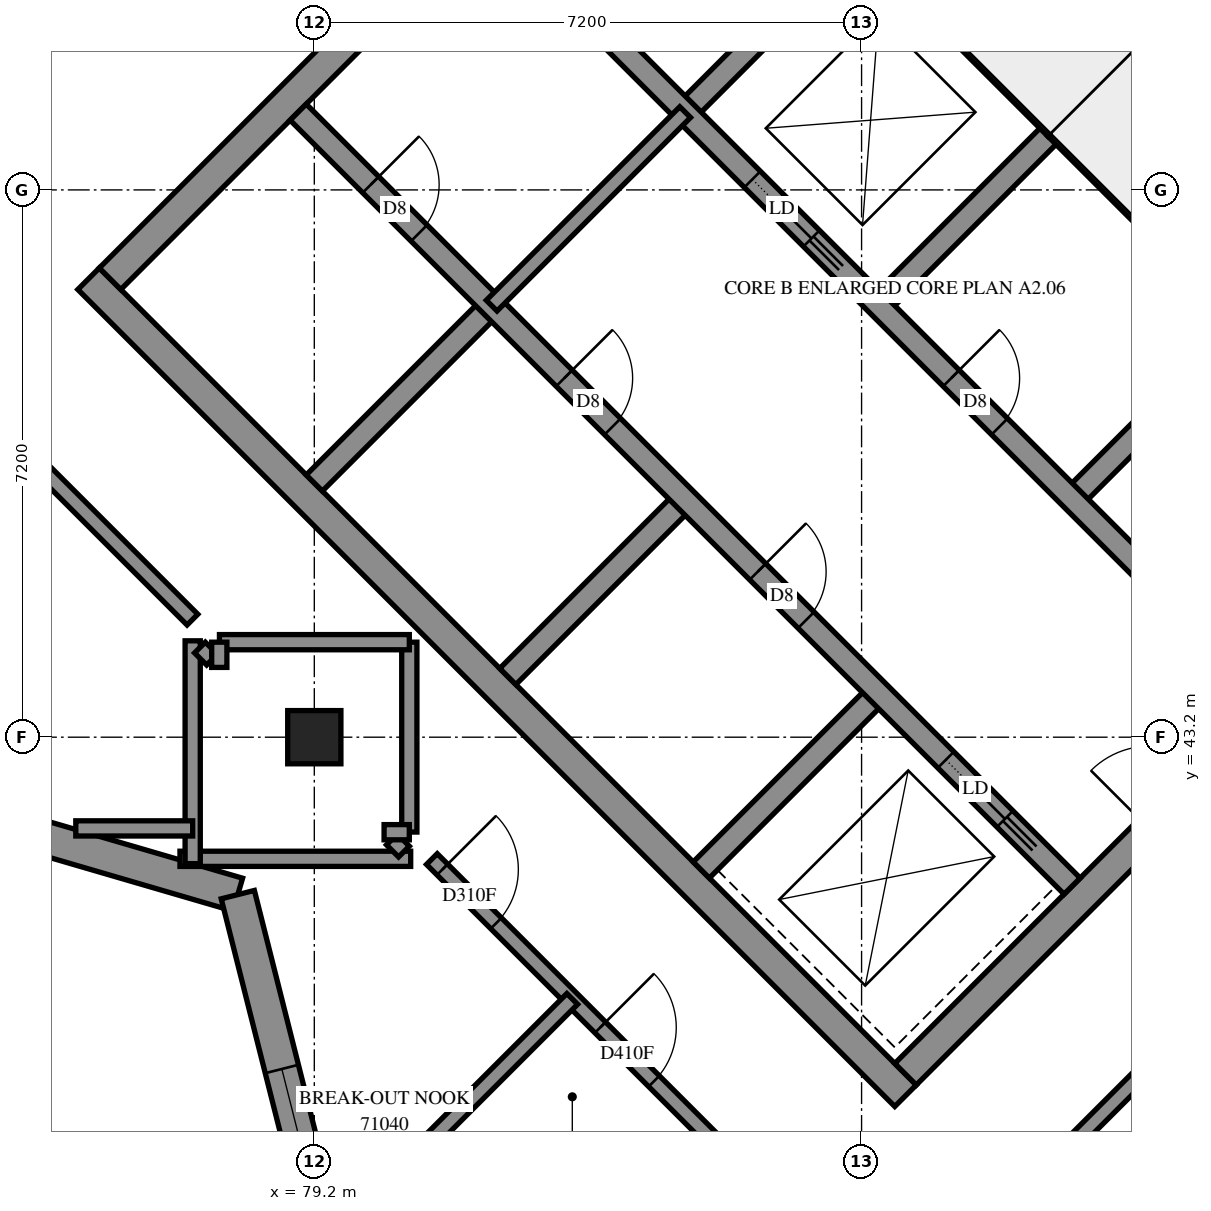
"""IFC4 building model, lengths in metres.
Left out: names, types, materials, properties, quantities, classifications, styles, units other than length and angle.
Written with IfcOpenShell. Run it as: python <this file> out.ifc"""

import sys

from ifc_helpers import new_model, si_unit, direction, frame, frame_2d, origin, origin_2d, place, context, subcontext, project, spatial, polyline, rectangle, outline, extrude, element, fill, save


model = new_model("IFC4")
c1 = context("Model", 3, precision=1e-05, world=origin(), true_north=direction((0.0, 1.0)))
c2 = subcontext(c1, "Body", "Model", "MODEL_VIEW")
j1 = project(units=[si_unit("LENGTHUNIT", "METRE"), si_unit("PLANEANGLEUNIT", "RADIAN")], contexts=[c1])
p1 = place(None, origin())
s1 = spatial("IfcSite", under=j1, at=p1, CompositionType="ELEMENT")
p2 = place(p1, origin())
s2 = spatial("IfcBuilding", under=s1, at=p2, CompositionType="ELEMENT")
p3 = place(p2, frame((0.0, 0.0, 260.8)))
s3 = spatial("IfcBuildingStorey", under=s2, at=p3, CompositionType="ELEMENT", Elevation=260.8)
p4 = place(p3, frame((79.2, 43.2, 0.0), z_axis=(0.0, 0.0, 1.0), x_axis=(1.0, 0.0, 0.0)))
e1 = element("IfcColumn", 1, at=p4, inside=s3, PredefinedType="COLUMN", context=c2, shape_type="SweptSolid", body=[
    extrude(rectangle(XDim=0.7, YDim=0.7, at=origin_2d()), origin(), (0.0, 0.0, 1.0), 3.1),
])
p5 = place(p3, frame((76.23, 49.231, -0.3), z_axis=(0.0, 0.0, 1.0), x_axis=(0.7071034917, -0.7071100706, 0.0)))
e2 = element("IfcWall", 2, at=p5, inside=s3, PredefinedType="SHEAR", context=c2, shape_type="SweptSolid", body=[
    extrude(rectangle(XDim=15.2, YDim=0.4, at=frame_2d((7.6, 0.0))), origin(), (0.0, 0.0, 1.0), 2.7),
])
p6 = place(p3, frame((86.695, 59.696, -0.3), z_axis=(0.0, 0.0, 1.0), x_axis=(0.7071100706, -0.7071034917, 0.0)))
e3 = element("IfcWall", 3, at=p6, inside=s3, PredefinedType="SHEAR", context=c2, shape_type="SweptSolid", body=[
    extrude(rectangle(XDim=15.2, YDim=0.4, at=frame_2d((7.6, 0.0))), origin(), (0.0, 0.0, 1.0), 2.7),
])
p7 = place(p6, frame((10.4, 0.0, 0.3)))
e4 = element("IfcOpeningElement", 4, at=p7, cuts=e3, PredefinedType="OPENING", context=c2, shape_type="SweptSolid", body=[
    extrude(rectangle(XDim=0.8, YDim=2.1, at=frame_2d((0.4, 1.05))), frame((0.0, 0.21, 0.0), z_axis=(0.0, -1.0, 0.0), x_axis=(1.0, 0.0, 0.0)), (0.0, 0.0, 1.0), 0.42),
])
p8 = place(p3, frame((76.513, 49.231, -0.3), z_axis=(0.0, 0.0, 1.0), x_axis=(0.7071067812, 0.7071067812, 0.0)))
e5 = element("IfcWall", 5, at=p8, inside=s3, PredefinedType="SHEAR", context=c2, shape_type="SweptSolid", body=[
    extrude(rectangle(XDim=14.4, YDim=0.4, at=frame_2d((7.2, 0.0))), origin(), (0.0, 0.0, 1.0), 2.7),
])
p9 = place(p8, frame((4.55, 0.0, 0.3)))
e6 = element("IfcOpeningElement", 6, at=p9, cuts=e5, PredefinedType="OPENING", context=c2, shape_type="SweptSolid", body=[
    extrude(rectangle(XDim=1.1, YDim=2.1, at=frame_2d((0.55, 1.05))), frame((0.0, 0.21, 0.0), z_axis=(0.0, -1.0, 0.0), x_axis=(1.0, 0.0, 0.0)), (0.0, 0.0, 1.0), 0.42),
])
p10 = place(p8, frame((11.35, 0.0, 0.3)))
e7 = element("IfcOpeningElement", 7, at=p10, cuts=e5, PredefinedType="OPENING", context=c2, shape_type="SweptSolid", body=[
    extrude(rectangle(XDim=1.1, YDim=2.1, at=frame_2d((0.55, 1.05))), frame((0.0, 0.21, 0.0), z_axis=(0.0, -1.0, 0.0), x_axis=(1.0, 0.0, 0.0)), (0.0, 0.0, 1.0), 0.42),
])
p11 = place(p3, frame((86.978, 38.766, -0.3), z_axis=(0.0, 0.0, 1.0), x_axis=(0.7071067812, 0.7071067812, 0.0)))
e8 = element("IfcWall", 8, at=p11, inside=s3, PredefinedType="SHEAR", context=c2, shape_type="SweptSolid", body=[
    extrude(rectangle(XDim=14.4, YDim=0.4, at=frame_2d((7.2, 0.0))), origin(), (0.0, 0.0, 1.0), 2.7),
])
p12 = place(p11, frame((4.55, 0.0, 0.3)))
e9 = element("IfcOpeningElement", 9, at=p12, cuts=e8, PredefinedType="OPENING", context=c2, shape_type="SweptSolid", body=[
    extrude(rectangle(XDim=1.1, YDim=2.1, at=frame_2d((0.55, 1.05))), frame((0.0, 0.21, 0.0), z_axis=(0.0, -1.0, 0.0), x_axis=(1.0, 0.0, 0.0)), (0.0, 0.0, 1.0), 0.42),
])
p13 = place(p11, frame((11.35, 0.0, 0.3)))
e10 = element("IfcOpeningElement", 10, at=p13, cuts=e8, PredefinedType="OPENING", context=c2, shape_type="SweptSolid", body=[
    extrude(rectangle(XDim=1.1, YDim=2.1, at=frame_2d((0.55, 1.05))), frame((0.0, 0.21, 0.0), z_axis=(0.0, -1.0, 0.0), x_axis=(1.0, 0.0, 0.0)), (0.0, 0.0, 1.0), 0.42),
])
for number, where, z_axis, x_axis in (
    (11, (79.2, 46.544, 0.0), (0.0, 0.0, 1.0), (0.707, 0.707, 0.0)),
    (12, (84.079, 51.423, 0.0), (0.0, 0.0, 1.0), (0.707, 0.707, 0.0)),
):
    element("IfcWall", number, at=place(p3, frame(where, z_axis=z_axis, x_axis=x_axis)), inside=s3, PredefinedType="SOLIDWALL", context=c2, shape_type="SweptSolid", body=[
        extrude(rectangle(XDim=3.3, YDim=0.3, at=frame_2d((1.65, 0.0))), origin(), (0.0, 0.0, 1.0), 3.1),
    ])
p14 = place(p3, frame((81.746, 43.999, 0.0), z_axis=(0.0, 0.0, 1.0), x_axis=(0.7071067812, 0.7071067812, 0.0)))
e13 = element("IfcWall", 13, at=p14, inside=s3, PredefinedType="SOLIDWALL", context=c2, shape_type="SweptSolid", body=[
    extrude(rectangle(XDim=3.3, YDim=0.3, at=frame_2d((1.65, 0.0))), origin(), (0.0, 0.0, 1.0), 3.1),
])
p15 = place(p3, frame((86.625, 48.878, 0.0), z_axis=(0.0, 0.0, 1.0), x_axis=(0.7071067812, 0.7071067812, 0.0)))
e14 = element("IfcWall", 14, at=p15, inside=s3, PredefinedType="SOLIDWALL", context=c2, shape_type="SweptSolid", body=[
    extrude(rectangle(XDim=3.3, YDim=0.3, at=frame_2d((1.65, 0.0))), origin(), (0.0, 0.0, 1.0), 3.1),
])
p16 = place(p3, frame((84.291, 41.453, 0.0), z_axis=(0.0, 0.0, 1.0), x_axis=(0.7071067812, 0.7071067812, 0.0)))
e15 = element("IfcWall", 15, at=p16, inside=s3, PredefinedType="SOLIDWALL", context=c2, shape_type="SweptSolid", body=[
    extrude(rectangle(XDim=3.3, YDim=0.3, at=frame_2d((1.65, 0.0))), origin(), (0.0, 0.0, 1.0), 3.1),
])
p17 = place(p3, frame((89.17, 46.332, 0.0), z_axis=(0.0, 0.0, 1.0), x_axis=(0.7071067812, 0.7071067812, 0.0)))
e16 = element("IfcWall", 16, at=p17, inside=s3, PredefinedType="SOLIDWALL", context=c2, shape_type="SweptSolid", body=[
    extrude(rectangle(XDim=3.3, YDim=0.3, at=frame_2d((1.65, 0.0))), origin(), (0.0, 0.0, 1.0), 3.1),
])
p18 = place(p3, frame((78.988, 51.423, 0.0), z_axis=(0.0, 0.0, 1.0), x_axis=(0.7071067812, -0.7071067812, 0.0)))
e17 = element("IfcWall", 17, at=p18, inside=s3, PredefinedType="SOLIDWALL", context=c2, shape_type="SweptSolid", body=[
    extrude(rectangle(XDim=14.4, YDim=0.3, at=frame_2d((7.2, 0.0))), origin(), (0.0, 0.0, 1.0), 3.1),
])
p19 = place(p18, frame((1.35, 0.0, 0.0)))
e18 = element("IfcOpeningElement", 18, at=p19, cuts=e17, PredefinedType="OPENING", context=c2, shape_type="SweptSolid", body=[
    extrude(rectangle(XDim=0.9, YDim=2.1, at=frame_2d((0.45, 1.05))), frame((0.0, 0.16, 0.0), z_axis=(0.0, -1.0, 0.0), x_axis=(1.0, 0.0, 0.0)), (0.0, 0.0, 1.0), 0.32),
])
p20 = place(p18, frame((4.95, 0.0, 0.0)))
e19 = element("IfcOpeningElement", 19, at=p20, cuts=e17, PredefinedType="OPENING", context=c2, shape_type="SweptSolid", body=[
    extrude(rectangle(XDim=0.9, YDim=2.1, at=frame_2d((0.45, 1.05))), frame((0.0, 0.16, 0.0), z_axis=(0.0, -1.0, 0.0), x_axis=(1.0, 0.0, 0.0)), (0.0, 0.0, 1.0), 0.32),
])
p21 = place(p18, frame((8.55, 0.0, 0.0)))
e20 = element("IfcOpeningElement", 20, at=p21, cuts=e17, PredefinedType="OPENING", context=c2, shape_type="SweptSolid", body=[
    extrude(rectangle(XDim=0.9, YDim=2.1, at=frame_2d((0.45, 1.05))), frame((0.0, 0.16, 0.0), z_axis=(0.0, -1.0, 0.0), x_axis=(1.0, 0.0, 0.0)), (0.0, 0.0, 1.0), 0.32),
])
p22 = place(p18, frame((12.05, 0.0, 0.0)))
e21 = element("IfcOpeningElement", 21, at=p22, cuts=e17, PredefinedType="OPENING", context=c2, shape_type="SweptSolid", body=[
    extrude(rectangle(XDim=1.1, YDim=2.1, at=frame_2d((0.55, 1.05))), frame((0.0, 0.16, 0.0), z_axis=(0.0, -1.0, 0.0), x_axis=(1.0, 0.0, 0.0)), (0.0, 0.0, 1.0), 0.32),
])
p23 = place(p3, frame((81.534, 53.969, 0.0), z_axis=(0.0, 0.0, 1.0), x_axis=(0.707103309, -0.7071102534, 0.0)))
e22 = element("IfcWall", 22, at=p23, inside=s3, PredefinedType="SOLIDWALL", context=c2, shape_type="SweptSolid", body=[
    extrude(rectangle(XDim=14.4, YDim=0.3, at=frame_2d((7.2, 0.0))), origin(), (0.0, 0.0, 1.0), 3.1),
])
p24 = place(p23, frame((8.55, 0.0, 0.0)))
e23 = element("IfcOpeningElement", 23, at=p24, cuts=e22, PredefinedType="OPENING", context=c2, shape_type="SweptSolid", body=[
    extrude(rectangle(XDim=0.9, YDim=2.1, at=frame_2d((0.45, 1.05))), frame((0.0, 0.16, 0.0), z_axis=(0.0, -1.0, 0.0), x_axis=(1.0, 0.0, 0.0)), (0.0, 0.0, 1.0), 0.32),
])
p25 = place(p23, frame((1.25, 0.0, 0.0)))
e24 = element("IfcOpeningElement", 24, at=p25, cuts=e22, PredefinedType="OPENING", context=c2, shape_type="SweptSolid", body=[
    extrude(rectangle(XDim=1.1, YDim=2.1, at=frame_2d((0.55, 1.05))), frame((0.0, 0.16, 0.0), z_axis=(0.0, -1.0, 0.0), x_axis=(1.0, 0.0, 0.0)), (0.0, 0.0, 1.0), 0.32),
])
p26 = place(p23, frame((4.85, 0.0, 0.0)))
e25 = element("IfcOpeningElement", 25, at=p26, cuts=e22, PredefinedType="OPENING", context=c2, shape_type="SweptSolid", body=[
    extrude(rectangle(XDim=1.1, YDim=2.1, at=frame_2d((0.55, 1.05))), frame((0.0, 0.16, 0.0), z_axis=(0.0, -1.0, 0.0), x_axis=(1.0, 0.0, 0.0)), (0.0, 0.0, 1.0), 0.32),
])
p27 = place(p23, frame((12.05, 0.0, 0.0)))
e26 = element("IfcOpeningElement", 26, at=p27, cuts=e22, PredefinedType="OPENING", context=c2, shape_type="SweptSolid", body=[
    extrude(rectangle(XDim=1.1, YDim=2.1, at=frame_2d((0.55, 1.05))), frame((0.0, 0.16, 0.0), z_axis=(0.0, -1.0, 0.0), x_axis=(1.0, 0.0, 0.0)), (0.0, 0.0, 1.0), 0.32),
])
for number, where, z_axis, x_axis in (
    (27, (83.867, 56.302, 0.0), (0.0, 0.0, 1.0), (0.707, -0.707, 0.0)),
    (28, (88.958, 51.211, 0.0), (0.0, 0.0, 1.0), (0.707, -0.707, 0.0)),
):
    element("IfcWall", number, at=place(p3, frame(where, z_axis=z_axis, x_axis=x_axis)), inside=s3, PredefinedType="SOLIDWALL", context=c2, shape_type="SweptSolid", body=[
        extrude(rectangle(XDim=7.2, YDim=0.3, at=frame_2d((3.6, 0.0))), origin(), (0.0, 0.0, 1.0), 3.1),
    ])
p28 = place(p3, frame((88.958, 51.211, 0.0), z_axis=(0.0, 0.0, 1.0), x_axis=(0.7071067812, 0.7071067812, 0.0)))
e29 = element("IfcWall", 29, at=p28, inside=s3, PredefinedType="SOLIDWALL", context=c2, shape_type="SweptSolid", body=[
    extrude(rectangle(XDim=4.2, YDim=0.3, at=frame_2d((2.1, 0.0))), origin(), (0.0, 0.0, 1.0), 3.1),
])
p29 = place(p3, frame((74.424, 42.229, 0.0), z_axis=(0.0, 0.0, 1.0), x_axis=(0.9599486399, -0.2801760317, 0.0)))
e30 = element("IfcWall", 30, at=p29, inside=s3, PredefinedType="SOLIDWALL", context=c2, shape_type="SweptSolid", body=[
    extrude(outline(polyline([(0.047, -0.225), (3.798, -0.225), (4.055, 0.225), (-0.047, 0.225), (0.047, -0.225)])), origin(), (0.0, 0.0, 1.0), 3.1),
])
p30 = place(p3, frame((78.194, 41.129, 0.0), z_axis=(0.0, 0.0, 1.0), x_axis=(0.2448760065, -0.9695544036, 0.0)))
e31 = element("IfcWall", 31, at=p30, inside=s3, PredefinedType="SOLIDWALL", context=c2, shape_type="SweptSolid", body=[
    extrude(outline(polyline([(0.129, -0.225), (4.812, -0.225), (4.555, 0.225), (-0.129, 0.225), (0.129, -0.225)])), origin(), (0.0, 0.0, 1.0), 3.1),
])
p31 = place(p30, frame((2.366, 0.0, 0.45)))
e32 = element("IfcOpeningElement", 32, at=p31, cuts=e31, PredefinedType="OPENING", context=c2, shape_type="SweptSolid", body=[
    extrude(rectangle(XDim=1.2, YDim=2.55, at=frame_2d((0.6, 1.275))), frame((0.0, 0.235, 0.0), z_axis=(0.0, -1.0, 0.0), x_axis=(1.0, 0.0, 0.0)), (0.0, 0.0, 1.0), 0.47),
])
p32 = place(p3, frame((81.534, 48.878, 0.0), z_axis=(0.0, 0.0, 1.0), x_axis=(0.707092892, 0.7071206701, 0.0)))
e33 = element("IfcWall", 33, at=p32, inside=s3, PredefinedType="PARTITIONING", context=c2, shape_type="SweptSolid", body=[
    extrude(rectangle(XDim=3.6, YDim=0.2, at=frame_2d((1.8, 0.0))), origin(), (0.0, 0.0, 1.0), 3.1),
])
p33 = place(p3, frame((84.954, 31.938, 0.0), z_axis=(0.0, 0.0, 1.0), x_axis=(0.7071769042, 0.7070366512, 0.0)))
e34 = element("IfcWall", 34, at=p33, inside=s3, PredefinedType="PARTITIONING", context=c2, shape_type="SweptSolid", body=[
    extrude(rectangle(XDim=14.26, YDim=0.2, at=frame_2d((7.13, 0.0))), origin(), (0.0, 0.0, 1.0), 3.1),
])
p34 = place(p3, frame((86.836, 35.514, 0.0), z_axis=(0.0, 0.0, 1.0), x_axis=(0.7071067812, 0.7071067812, 0.0)))
e35 = element("IfcWall", 35, at=p34, inside=s3, PredefinedType="PARTITIONING", context=c2, shape_type="SweptSolid", body=[
    extrude(rectangle(XDim=10.4, YDim=0.2, at=frame_2d((5.2, 0.0))), origin(), (0.0, 0.0, 1.0), 3.1),
])
p35 = place(p34, frame((9.207, 0.0, 0.0)))
e36 = element("IfcOpeningElement", 36, at=p35, cuts=e35, PredefinedType="OPENING", context=c2, shape_type="SweptSolid", body=[
    extrude(rectangle(XDim=1.0, YDim=2.1, at=frame_2d((0.5, 1.05))), frame((0.0, 0.11, 0.0), z_axis=(0.0, -1.0, 0.0), x_axis=(1.0, 0.0, 0.0)), (0.0, 0.0, 1.0), 0.22),
])
p36 = place(p3, frame((80.747, 41.597, 0.0), z_axis=(0.0, 0.0, 1.0), x_axis=(0.7071067812, -0.7071067812, 0.0)))
e37 = element("IfcWall", 37, at=p36, inside=s3, PredefinedType="PARTITIONING", context=c2, shape_type="SweptSolid", body=[
    extrude(rectangle(XDim=8.607, YDim=0.2, at=frame_2d((4.303, 0.0))), origin(), (0.0, 0.0, 1.0), 3.1),
])
p37 = place(p36, frame((0.195, 0.0, 0.0)))
e38 = element("IfcOpeningElement", 38, at=p37, cuts=e37, PredefinedType="OPENING", context=c2, shape_type="SweptSolid", body=[
    extrude(rectangle(XDim=1.0, YDim=2.1, at=frame_2d((0.5, 1.05))), frame((0.0, 0.11, 0.0), z_axis=(0.0, -1.0, 0.0), x_axis=(1.0, 0.0, 0.0)), (0.0, 0.0, 1.0), 0.22),
])
p38 = place(p36, frame((3.133, 0.0, 0.0)))
e39 = element("IfcOpeningElement", 39, at=p38, cuts=e37, PredefinedType="OPENING", context=c2, shape_type="SweptSolid", body=[
    extrude(rectangle(XDim=1.0, YDim=2.1, at=frame_2d((0.5, 1.05))), frame((0.0, 0.11, 0.0), z_axis=(0.0, -1.0, 0.0), x_axis=(1.0, 0.0, 0.0)), (0.0, 0.0, 1.0), 0.22),
])
p39 = place(p3, frame((74.347, 47.997, 0.0), z_axis=(0.0, 0.0, 1.0), x_axis=(0.7071067812, -0.7071067812, 0.0)))
e40 = element("IfcWall", 40, at=p39, inside=s3, PredefinedType="PARTITIONING", context=c2, shape_type="SweptSolid", body=[
    extrude(rectangle(XDim=4.596, YDim=0.2, at=frame_2d((2.298, 0.0))), origin(), (0.0, 0.0, 1.0), 3.1),
])
p40 = place(p39, frame((0.35, 0.0, 0.0)))
e41 = element("IfcOpeningElement", 41, at=p40, cuts=e40, PredefinedType="OPENING", context=c2, shape_type="SweptSolid", body=[
    extrude(rectangle(XDim=1.0, YDim=2.1, at=frame_2d((0.5, 1.05))), frame((0.0, 0.11, 0.0), z_axis=(0.0, -1.0, 0.0), x_axis=(1.0, 0.0, 0.0)), (0.0, 0.0, 1.0), 0.22),
])
p41 = place(p3, frame((79.587, 36.75, 0.0), z_axis=(0.0, 0.0, 1.0), x_axis=(0.7071185405, 0.7070950217, 0.0)))
e42 = element("IfcWall", 42, at=p41, inside=s3, PredefinedType="PARTITIONING", context=c2, shape_type="SweptSolid", body=[
    extrude(rectangle(XDim=4.252, YDim=0.2, at=frame_2d((2.126, 0.0))), origin(), (0.0, 0.0, 1.0), 3.1),
])
p42 = place(p3, frame((77.433, 41.6, 0.0), z_axis=(0.0, 0.0, 1.0), x_axis=(1.0, 0.0, 0.0)))
e43 = element("IfcWall", 43, at=p42, inside=s3, PredefinedType="PARTITIONING", context=c2, shape_type="SweptSolid", body=[
    extrude(rectangle(XDim=3.035, YDim=0.2, at=frame_2d((1.518, 0.0))), origin(), (0.0, 0.0, 1.0), 3.1),
])
p43 = place(p3, frame((77.6, 41.536, 0.0), z_axis=(0.0, 0.0, 1.0), x_axis=(0.0, 1.0, 0.0)))
e44 = element("IfcWall", 44, at=p43, inside=s3, PredefinedType="PARTITIONING", context=c2, shape_type="SweptSolid", body=[
    extrude(rectangle(XDim=2.932, YDim=0.2, at=frame_2d((1.466, 0.0))), origin(), (0.0, 0.0, 1.0), 3.1),
])
for number, where, z_axis, x_axis in (
    (45, (80.45, 41.952, 0.0), (0.0, 0.0, 1.0), (0.0, 1.0, 0.0)),
    (46, (77.952, 44.45, 0.0), (0.0, 0.0, 1.0), (1.0, 0.0, 0.0)),
):
    element("IfcWall", number, at=place(p3, frame(where, z_axis=z_axis, x_axis=x_axis)), inside=s3, PredefinedType="PARTITIONING", context=c2, shape_type="SweptSolid", body=[
        extrude(rectangle(XDim=2.498, YDim=0.2, at=frame_2d((1.249, 0.0))), origin(), (0.0, 0.0, 1.0), 3.1),
    ])
p44 = place(p3, frame((76.062, 42.0, 0.0), z_axis=(0.0, 0.0, 1.0), x_axis=(1.0, 0.0, 0.0)))
e47 = element("IfcWall", 47, at=p44, inside=s3, PredefinedType="PARTITIONING", context=c2, shape_type="SweptSolid", body=[
    extrude(rectangle(XDim=1.538, YDim=0.2, at=frame_2d((0.769, 0.0))), origin(), (0.0, 0.0, 1.0), 3.1),
])
for number, where, z_axis, x_axis in (
    (48, (80.221, 41.855, 0.0), (0.0, 0.0, 1.0), (0.707, -0.707, 0.0)),
    (49, (77.695, 44.38, 0.0), (0.0, 0.0, 1.0), (0.707, -0.707, 0.0)),
):
    element("IfcWall", number, at=place(p3, frame(where, z_axis=z_axis, x_axis=x_axis)), inside=s3, PredefinedType="PARTITIONING", context=c2, shape_type="SweptSolid", body=[
        extrude(rectangle(XDim=0.225, YDim=0.2, at=frame_2d((0.112, 0.0))), origin(), (0.0, 0.0, 1.0), 3.1),
    ])
for number, where, z_axis, x_axis in (
    (50, (80.118, 41.95, 0.0), (0.0, 0.0, 1.0), (1.0, 0.0, 0.0)),
    (51, (77.95, 44.118, 0.0), (0.0, 0.0, 1.0), (0.0, 1.0, 0.0)),
):
    element("IfcWall", number, at=place(p3, frame(where, z_axis=z_axis, x_axis=x_axis)), inside=s3, PredefinedType="PARTITIONING", context=c2, shape_type="SweptSolid", body=[
        extrude(rectangle(XDim=0.332, YDim=0.2, at=frame_2d((0.166, 0.0))), origin(), (0.0, 0.0, 1.0), 3.1),
    ])
p45 = place(p31, origin())
e52 = element("IfcWindow", 52, at=p45, inside=s3, PartitioningType="SINGLE_PANEL", PredefinedType="WINDOW", context=c2, shape_type="SweptSolid", body=[
    extrude(rectangle(XDim=1.2, YDim=2.55, at=frame_2d((0.6, 1.275))), frame((0.0, 0.205, 0.0), z_axis=(0.0, -1.0, 0.0), x_axis=(1.0, 0.0, 0.0)), (0.0, 0.0, 1.0), 0.06),
])
fill(e32, e52)
p46 = place(p19, origin())
e53 = element("IfcDoor", 53, at=p46, inside=s3, OperationType="SINGLE_SWING_LEFT", PredefinedType="DOOR", context=c2, shape_type="SweptSolid", body=[
    extrude(rectangle(XDim=0.9, YDim=2.1, at=frame_2d((0.45, 1.05))), frame((0.0, 0.025, 0.0), z_axis=(0.0, -1.0, 0.0), x_axis=(1.0, 0.0, 0.0)), (0.0, 0.0, 1.0), 0.05),
])
fill(e18, e53)
p47 = place(p20, origin())
e54 = element("IfcDoor", 54, at=p47, inside=s3, OperationType="SINGLE_SWING_LEFT", PredefinedType="DOOR", context=c2, shape_type="SweptSolid", body=[
    extrude(rectangle(XDim=0.9, YDim=2.1, at=frame_2d((0.45, 1.05))), frame((0.0, 0.025, 0.0), z_axis=(0.0, -1.0, 0.0), x_axis=(1.0, 0.0, 0.0)), (0.0, 0.0, 1.0), 0.05),
])
fill(e19, e54)
p48 = place(p21, origin())
e55 = element("IfcDoor", 55, at=p48, inside=s3, OperationType="SINGLE_SWING_LEFT", PredefinedType="DOOR", context=c2, shape_type="SweptSolid", body=[
    extrude(rectangle(XDim=0.9, YDim=2.1, at=frame_2d((0.45, 1.05))), frame((0.0, 0.025, 0.0), z_axis=(0.0, -1.0, 0.0), x_axis=(1.0, 0.0, 0.0)), (0.0, 0.0, 1.0), 0.05),
])
fill(e20, e55)
p49 = place(p24, origin())
e56 = element("IfcDoor", 56, at=p49, inside=s3, OperationType="SINGLE_SWING_LEFT", PredefinedType="DOOR", context=c2, shape_type="SweptSolid", body=[
    extrude(rectangle(XDim=0.9, YDim=2.1, at=frame_2d((0.45, 1.05))), frame((0.0, 0.025, 0.0), z_axis=(0.0, -1.0, 0.0), x_axis=(1.0, 0.0, 0.0)), (0.0, 0.0, 1.0), 0.05),
])
fill(e23, e56)
p50 = place(p22, origin())
e57 = element("IfcDoor", 57, at=p50, inside=s3, OperationType="SLIDING_TO_RIGHT", PredefinedType="DOOR", context=c2, shape_type="SweptSolid", body=[
    extrude(rectangle(XDim=1.1, YDim=2.1, at=frame_2d((0.55, 1.05))), frame((0.0, 0.025, 0.0), z_axis=(0.0, -1.0, 0.0), x_axis=(1.0, 0.0, 0.0)), (0.0, 0.0, 1.0), 0.05),
])
fill(e21, e57)
p51 = place(p26, origin())
e58 = element("IfcDoor", 58, at=p51, inside=s3, OperationType="SLIDING_TO_RIGHT", PredefinedType="DOOR", context=c2, shape_type="SweptSolid", body=[
    extrude(rectangle(XDim=1.1, YDim=2.1, at=frame_2d((0.55, 1.05))), frame((0.0, 0.025, 0.0), z_axis=(0.0, -1.0, 0.0), x_axis=(1.0, 0.0, 0.0)), (0.0, 0.0, 1.0), 0.05),
])
fill(e25, e58)
p52 = place(p37, origin())
e59 = element("IfcDoor", 59, at=p52, inside=s3, OperationType="SINGLE_SWING_LEFT", PredefinedType="DOOR", context=c2, shape_type="SweptSolid", body=[
    extrude(rectangle(XDim=1.0, YDim=2.1, at=frame_2d((0.5, 1.05))), frame((0.0, 0.025, 0.0), z_axis=(0.0, -1.0, 0.0), x_axis=(1.0, 0.0, 0.0)), (0.0, 0.0, 1.0), 0.05),
])
fill(e38, e59)
p53 = place(p38, origin())
e60 = element("IfcDoor", 60, at=p53, inside=s3, OperationType="SINGLE_SWING_LEFT", PredefinedType="DOOR", context=c2, shape_type="SweptSolid", body=[
    extrude(rectangle(XDim=1.0, YDim=2.1, at=frame_2d((0.5, 1.05))), frame((0.0, 0.025, 0.0), z_axis=(0.0, -1.0, 0.0), x_axis=(1.0, 0.0, 0.0)), (0.0, 0.0, 1.0), 0.05),
])
fill(e39, e60)
save(model, sys.argv[1])
